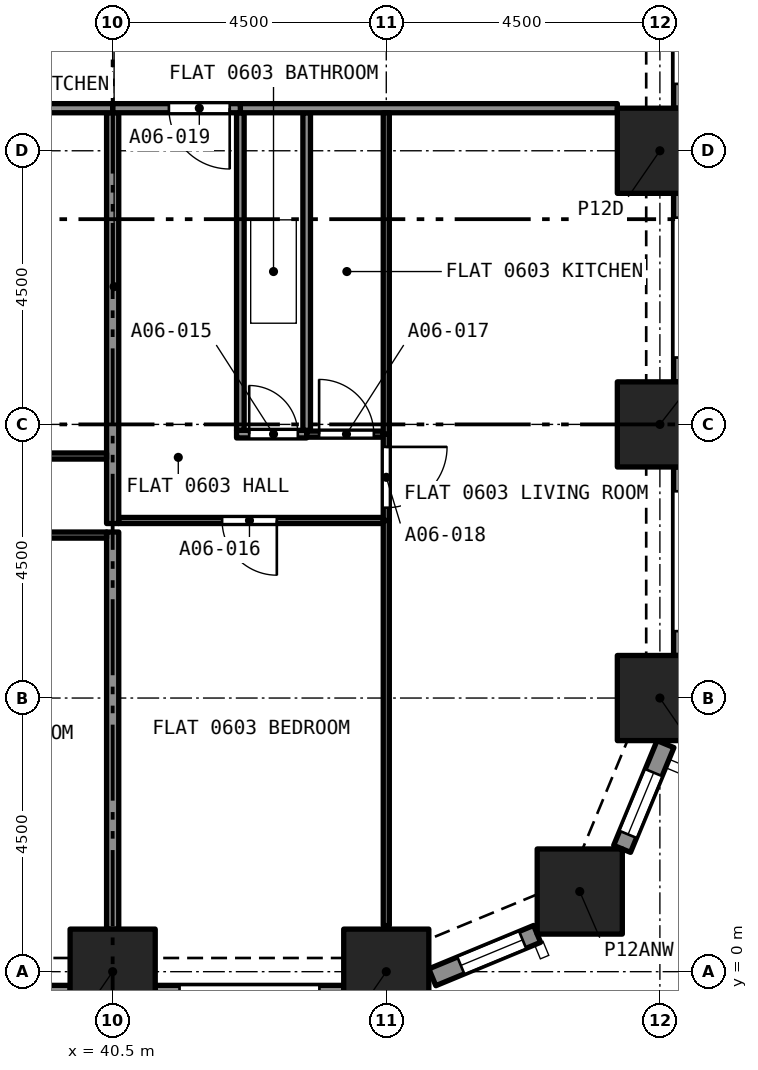
"""IFC4 building model, lengths in metres.
Left out: names, types, materials, properties, quantities, classifications, styles, units other than length and angle.
Written with IfcOpenShell. Run it as: python <this file> out.ifc"""

import sys

from ifc_helpers import new_model, si_unit, direction, frame, frame_2d, origin, origin_2d, place, context, subcontext, project, spatial, rectangle, extrude, element, fill, save


model = new_model("IFC4")
c1 = context("Model", 3, precision=1e-05, world=origin(), true_north=direction((0.0, 1.0)))
c2 = subcontext(c1, "Body", "Model", "MODEL_VIEW")
j1 = project(units=[si_unit("LENGTHUNIT", "METRE"), si_unit("PLANEANGLEUNIT", "RADIAN")], contexts=[c1])
p1 = place(None, origin())
s1 = spatial("IfcSite", under=j1, at=p1, CompositionType="ELEMENT")
p2 = place(p1, origin())
s2 = spatial("IfcBuilding", under=s1, at=p2, CompositionType="ELEMENT")
p3 = place(p2, frame((0.0, 0.0, 30.4)))
s3 = spatial("IfcBuildingStorey", under=s2, at=p3, CompositionType="ELEMENT", Elevation=30.4)
for number, where, z_axis, x_axis in (
    (1, (40.5, 0.0, 0.0), (0.0, 0.0, 1.0), (1.0, 0.0, 0.0)),
    (2, (45.0, 0.0, 0.0), (0.0, 0.0, 1.0), (1.0, 0.0, 0.0)),
    (3, (48.182, 1.318, 0.0), (0.0, 0.0, 1.0), (1.0, 0.0, 0.0)),
    (4, (49.5, 4.5, 0.0), (0.0, 0.0, 1.0), (1.0, 0.0, 0.0)),
    (5, (49.5, 9.0, 0.0), (0.0, 0.0, 1.0), (1.0, 0.0, 0.0)),
    (6, (49.5, 13.5, 0.0), (0.0, 0.0, 1.0), (1.0, 0.0, 0.0)),
):
    element("IfcColumn", number, at=place(p3, frame(where, z_axis=z_axis, x_axis=x_axis)), inside=s3, PredefinedType="COLUMN", context=c2, shape_type="SweptSolid", body=[
        extrude(rectangle(XDim=1.4, YDim=1.4, at=origin_2d()), origin(), (0.0, 0.0, 1.0), 3.2),
    ])
p4 = place(p3, frame((39.8, -0.375, 0.0), z_axis=(0.0, 0.0, 1.0), x_axis=(-1.0, 0.0, 0.0)))
e7 = element("IfcWall", 7, at=p4, inside=s3, PredefinedType="SOLIDWALL", context=c2, shape_type="SweptSolid", body=[
    extrude(rectangle(XDim=3.1, YDim=0.3, at=frame_2d((1.55, 0.0))), origin(), (0.0, 0.0, 1.0), 3.2),
])
p5 = place(p4, frame((0.4, 0.0, 0.45)))
e8 = element("IfcOpeningElement", 8, at=p5, cuts=e7, PredefinedType="OPENING", context=c2, shape_type="SweptSolid", body=[
    extrude(rectangle(XDim=2.3, YDim=1.95, at=frame_2d((1.15, 0.975))), frame((0.0, 0.16, 0.0), z_axis=(0.0, -1.0, 0.0), x_axis=(1.0, 0.0, 0.0)), (0.0, 0.0, 1.0), 0.32),
])
p6 = place(p3, frame((44.3, -0.375, 0.0), z_axis=(0.0, 0.0, 1.0), x_axis=(-1.0, 0.0, 0.0)))
e9 = element("IfcWall", 9, at=p6, inside=s3, PredefinedType="SOLIDWALL", context=c2, shape_type="SweptSolid", body=[
    extrude(rectangle(XDim=3.1, YDim=0.3, at=frame_2d((1.55, 0.0))), origin(), (0.0, 0.0, 1.0), 3.2),
])
p7 = place(p6, frame((0.4, 0.0, 0.45)))
e10 = element("IfcOpeningElement", 10, at=p7, cuts=e9, PredefinedType="OPENING", context=c2, shape_type="SweptSolid", body=[
    extrude(rectangle(XDim=2.3, YDim=1.95, at=frame_2d((1.15, 0.975))), frame((0.0, 0.16, 0.0), z_axis=(0.0, -1.0, 0.0), x_axis=(1.0, 0.0, 0.0)), (0.0, 0.0, 1.0), 0.32),
])
p8 = place(p3, frame((47.48, 0.622, 0.0), z_axis=(0.0, 0.0, 1.0), x_axis=(-0.923903565336, -0.38262540684, 0.0)))
e11 = element("IfcWall", 11, at=p8, inside=s3, PredefinedType="SOLIDWALL", context=c2, shape_type="SweptSolid", body=[
    extrude(rectangle(XDim=1.865, YDim=0.3, at=frame_2d((0.933, 0.0))), origin(), (0.0, 0.0, 1.0), 3.2),
])
p9 = place(p8, frame((0.258, 0.0, 0.45)))
e12 = element("IfcOpeningElement", 12, at=p9, cuts=e11, PredefinedType="OPENING", context=c2, shape_type="SweptSolid", body=[
    extrude(rectangle(XDim=1.1, YDim=1.95, at=frame_2d((0.55, 0.975))), frame((0.0, 0.16, 0.0), z_axis=(0.0, -1.0, 0.0), x_axis=(1.0, 0.0, 0.0)), (0.0, 0.0, 1.0), 0.32),
])
p10 = place(p3, frame((49.592, 3.743, 0.0), z_axis=(0.0, 0.0, 1.0), x_axis=(-0.382737135771, -0.923857286003, 0.0)))
e13 = element("IfcWall", 13, at=p10, inside=s3, PredefinedType="SOLIDWALL", context=c2, shape_type="SweptSolid", body=[
    extrude(rectangle(XDim=1.865, YDim=0.3, at=frame_2d((0.933, 0.0))), origin(), (0.0, 0.0, 1.0), 3.2),
])
p11 = place(p10, frame((0.508, 0.0, 0.45)))
e14 = element("IfcOpeningElement", 14, at=p11, cuts=e13, PredefinedType="OPENING", context=c2, shape_type="SweptSolid", body=[
    extrude(rectangle(XDim=1.1, YDim=1.95, at=frame_2d((0.55, 0.975))), frame((0.0, 0.16, 0.0), z_axis=(0.0, -1.0, 0.0), x_axis=(1.0, 0.0, 0.0)), (0.0, 0.0, 1.0), 0.32),
])
p12 = place(p3, frame((49.875, 8.3, 0.0), z_axis=(0.0, 0.0, 1.0), x_axis=(0.0, -1.0, 0.0)))
e15 = element("IfcWall", 15, at=p12, inside=s3, PredefinedType="SOLIDWALL", context=c2, shape_type="SweptSolid", body=[
    extrude(rectangle(XDim=3.1, YDim=0.3, at=frame_2d((1.55, 0.0))), origin(), (0.0, 0.0, 1.0), 3.2),
])
p13 = place(p12, frame((0.4, 0.0, 0.45)))
e16 = element("IfcOpeningElement", 16, at=p13, cuts=e15, PredefinedType="OPENING", context=c2, shape_type="SweptSolid", body=[
    extrude(rectangle(XDim=2.3, YDim=1.95, at=frame_2d((1.15, 0.975))), frame((0.0, 0.16, 0.0), z_axis=(0.0, -1.0, 0.0), x_axis=(1.0, 0.0, 0.0)), (0.0, 0.0, 1.0), 0.32),
])
p14 = place(p3, frame((49.875, 12.8, 0.0), z_axis=(0.0, 0.0, 1.0), x_axis=(0.0, -1.0, 0.0)))
e17 = element("IfcWall", 17, at=p14, inside=s3, PredefinedType="SOLIDWALL", context=c2, shape_type="SweptSolid", body=[
    extrude(rectangle(XDim=3.1, YDim=0.3, at=frame_2d((1.55, 0.0))), origin(), (0.0, 0.0, 1.0), 3.2),
])
p15 = place(p14, frame((0.4, 0.0, 0.45)))
e18 = element("IfcOpeningElement", 18, at=p15, cuts=e17, PredefinedType="OPENING", context=c2, shape_type="SweptSolid", body=[
    extrude(rectangle(XDim=2.3, YDim=1.95, at=frame_2d((1.15, 0.975))), frame((0.0, 0.16, 0.0), z_axis=(0.0, -1.0, 0.0), x_axis=(1.0, 0.0, 0.0)), (0.0, 0.0, 1.0), 0.32),
])
p16 = place(p3, frame((49.875, 17.3, 0.0), z_axis=(0.0, 0.0, 1.0), x_axis=(0.0, -1.0, 0.0)))
e19 = element("IfcWall", 19, at=p16, inside=s3, PredefinedType="SOLIDWALL", context=c2, shape_type="SweptSolid", body=[
    extrude(rectangle(XDim=3.1, YDim=0.3, at=frame_2d((1.55, 0.0))), origin(), (0.0, 0.0, 1.0), 3.2),
])
p17 = place(p16, frame((0.4, 0.0, 0.45)))
e20 = element("IfcOpeningElement", 20, at=p17, cuts=e19, PredefinedType="OPENING", context=c2, shape_type="SweptSolid", body=[
    extrude(rectangle(XDim=2.3, YDim=1.95, at=frame_2d((1.15, 0.975))), frame((0.0, 0.16, 0.0), z_axis=(0.0, -1.0, 0.0), x_axis=(1.0, 0.0, 0.0)), (0.0, 0.0, 1.0), 0.32),
])
p18 = place(p3, frame((42.538, 8.84, 0.0), z_axis=(0.0, 0.0, 1.0), x_axis=(1.0, 0.0, 0.0)))
e21 = element("IfcWall", 21, at=p18, inside=s3, PredefinedType="PARTITIONING", context=c2, shape_type="SweptSolid", body=[
    extrude(rectangle(XDim=1.153, YDim=0.125, at=frame_2d((0.577, 0.0))), origin(), (0.0, 0.0, 1.0), 2.9),
])
p19 = place(p18, frame((0.208, 0.0, 0.0)))
e22 = element("IfcOpeningElement", 22, at=p19, cuts=e21, PredefinedType="OPENING", context=c2, shape_type="SweptSolid", body=[
    extrude(rectangle(XDim=0.8, YDim=2.1, at=frame_2d((0.4, 1.05))), frame((0.0, 0.073, 0.0), z_axis=(0.0, -1.0, 0.0), x_axis=(1.0, 0.0, 0.0)), (0.0, 0.0, 1.0), 0.145),
])
for number, where, z_axis, x_axis in (
    (23, (42.6, 8.903, 0.0), (0.0, 0.0, 1.0), (0.0, 1.0, 0.0)),
    (24, (43.691, 8.903, 0.0), (0.0, 0.0, 1.0), (0.0, 1.0, 0.0)),
):
    element("IfcWall", number, at=place(p3, frame(where, z_axis=z_axis, x_axis=x_axis)), inside=s3, PredefinedType="PARTITIONING", context=c2, shape_type="SweptSolid", body=[
        extrude(rectangle(XDim=5.222, YDim=0.125, at=frame_2d((2.611, 0.0))), origin(), (0.0, 0.0, 1.0), 2.9),
    ])
p20 = place(p3, frame((42.6, 14.2, 0.0), z_axis=(0.0, 0.0, 1.0), x_axis=(1.0, 0.0, 0.0)))
e25 = element("IfcWall", 25, at=p20, inside=s3, PredefinedType="PARTITIONING", context=c2, shape_type="SweptSolid", body=[
    extrude(rectangle(XDim=6.2, YDim=0.15, at=frame_2d((3.1, 0.0))), origin(), (0.0, 0.0, 1.0), 2.9),
])
p21 = place(p3, frame((44.95, 7.42, 0.0), z_axis=(0.0, 0.0, 1.0), x_axis=(-1.0, 0.0, 0.0)))
e26 = element("IfcWall", 26, at=p21, inside=s3, PredefinedType="PARTITIONING", context=c2, shape_type="SweptSolid", body=[
    extrude(rectangle(XDim=4.35, YDim=0.1, at=frame_2d((2.175, 0.0))), origin(), (0.0, 0.0, 1.0), 2.9),
])
p22 = place(p21, frame((1.75, 0.0, 0.0)))
e27 = element("IfcOpeningElement", 27, at=p22, cuts=e26, PredefinedType="OPENING", context=c2, shape_type="SweptSolid", body=[
    extrude(rectangle(XDim=0.9, YDim=2.1, at=frame_2d((0.45, 1.05))), frame((0.0, 0.06, 0.0), z_axis=(0.0, -1.0, 0.0), x_axis=(1.0, 0.0, 0.0)), (0.0, 0.0, 1.0), 0.12),
])
p23 = place(p3, frame((45.0, 0.758, 0.0), z_axis=(0.0, 0.0, 1.0), x_axis=(0.0, 1.0, 0.0)))
e28 = element("IfcWall", 28, at=p23, inside=s3, PredefinedType="PARTITIONING", context=c2, shape_type="SweptSolid", body=[
    extrude(rectangle(XDim=6.662, YDim=0.1, at=frame_2d((3.331, 0.0))), origin(), (0.0, 0.0, 1.0), 2.9),
])
p24 = place(p3, frame((40.5, 0.7, 0.0), z_axis=(0.0, 0.0, 1.0), x_axis=(0.0, 1.0, 0.0)))
e29 = element("IfcWall", 29, at=p24, inside=s3, PredefinedType="PARTITIONING", context=c2, shape_type="SweptSolid", body=[
    extrude(rectangle(XDim=6.53, YDim=0.2, at=frame_2d((3.265, 0.0))), origin(), (0.0, 0.0, 1.0), 2.9),
])
p25 = place(p3, frame((43.691, 8.84, 0.0), z_axis=(0.0, 0.0, 1.0), x_axis=(1.0, 0.0, 0.0)))
e30 = element("IfcWall", 30, at=p25, inside=s3, PredefinedType="PARTITIONING", context=c2, shape_type="SweptSolid", body=[
    extrude(rectangle(XDim=1.259, YDim=0.1, at=frame_2d((0.629, 0.0))), origin(), (0.0, 0.0, 1.0), 2.9),
])
p26 = place(p25, frame((0.205, 0.0, 0.0)))
e31 = element("IfcOpeningElement", 31, at=p26, cuts=e30, PredefinedType="OPENING", context=c2, shape_type="SweptSolid", body=[
    extrude(rectangle(XDim=0.9, YDim=2.1, at=frame_2d((0.45, 1.05))), frame((0.0, 0.06, 0.0), z_axis=(0.0, -1.0, 0.0), x_axis=(1.0, 0.0, 0.0)), (0.0, 0.0, 1.0), 0.12),
])
p27 = place(p3, frame((45.0, 8.84, 0.0), z_axis=(0.0, 0.0, 1.0), x_axis=(0.0, -1.0, 0.0)))
e32 = element("IfcWall", 32, at=p27, inside=s3, PredefinedType="PARTITIONING", context=c2, shape_type="SweptSolid", body=[
    extrude(rectangle(XDim=1.42, YDim=0.1, at=frame_2d((0.71, 0.0))), origin(), (0.0, 0.0, 1.0), 2.9),
])
p28 = place(p27, frame((0.21, 0.0, 0.0)))
e33 = element("IfcOpeningElement", 33, at=p28, cuts=e32, PredefinedType="OPENING", context=c2, shape_type="SweptSolid", body=[
    extrude(rectangle(XDim=1.0, YDim=2.1, at=frame_2d((0.5, 1.05))), frame((0.0, 0.06, 0.0), z_axis=(0.0, -1.0, 0.0), x_axis=(1.0, 0.0, 0.0)), (0.0, 0.0, 1.0), 0.12),
])
p29 = place(p3, frame((40.5, 7.37, 0.0), z_axis=(0.0, 0.0, 1.0), x_axis=(0.0, 1.0, 0.0)))
e34 = element("IfcWall", 34, at=p29, inside=s3, PredefinedType="PARTITIONING", context=c2, shape_type="SweptSolid", body=[
    extrude(rectangle(XDim=6.755, YDim=0.2, at=frame_2d((3.377, 0.0))), origin(), (0.0, 0.0, 1.0), 2.9),
])
p30 = place(p3, frame((42.6, 14.2, 0.0), z_axis=(0.0, 0.0, 1.0), x_axis=(-1.0, 0.0, 0.0)))
e35 = element("IfcWall", 35, at=p30, inside=s3, PredefinedType="PARTITIONING", context=c2, shape_type="SweptSolid", body=[
    extrude(rectangle(XDim=2.1, YDim=0.15, at=frame_2d((1.05, 0.0))), origin(), (0.0, 0.0, 1.0), 2.9),
])
p31 = place(p30, frame((0.175, 0.0, 0.0)))
e36 = element("IfcOpeningElement", 36, at=p31, cuts=e35, PredefinedType="OPENING", context=c2, shape_type="SweptSolid", body=[
    extrude(rectangle(XDim=1.0, YDim=2.1, at=frame_2d((0.5, 1.05))), frame((0.0, 0.085, 0.0), z_axis=(0.0, -1.0, 0.0), x_axis=(1.0, 0.0, 0.0)), (0.0, 0.0, 1.0), 0.17),
])
p32 = place(p3, frame((45.0, 8.84, 0.0), z_axis=(0.0, 0.0, 1.0), x_axis=(0.0, 1.0, 0.0)))
e37 = element("IfcWall", 37, at=p32, inside=s3, PredefinedType="PARTITIONING", context=c2, shape_type="SweptSolid", body=[
    extrude(rectangle(XDim=5.285, YDim=0.1, at=frame_2d((2.643, 0.0))), origin(), (0.0, 0.0, 1.0), 2.9),
])
p33 = place(p3, frame((34.425, 14.2, 0.0), z_axis=(0.0, 0.0, 1.0), x_axis=(1.0, 0.0, 0.0)))
e38 = element("IfcWall", 38, at=p33, inside=s3, PredefinedType="PARTITIONING", context=c2, shape_type="SweptSolid", body=[
    extrude(rectangle(XDim=6.075, YDim=0.15, at=frame_2d((3.038, 0.0))), origin(), (0.0, 0.0, 1.0), 2.9),
])
p34 = place(p3, frame((40.4, 7.18, 0.0), z_axis=(0.0, 0.0, 1.0), x_axis=(-1.0, 0.0, 0.0)))
e39 = element("IfcWall", 39, at=p34, inside=s3, PredefinedType="PARTITIONING", context=c2, shape_type="SweptSolid", body=[
    extrude(rectangle(XDim=4.4, YDim=0.1, at=frame_2d((2.2, 0.0))), origin(), (0.0, 0.0, 1.0), 2.9),
])
p35 = place(p34, frame((1.7, 0.0, 0.0)))
e40 = element("IfcOpeningElement", 40, at=p35, cuts=e39, PredefinedType="OPENING", context=c2, shape_type="SweptSolid", body=[
    extrude(rectangle(XDim=0.9, YDim=2.1, at=frame_2d((0.45, 1.05))), frame((0.0, 0.06, 0.0), z_axis=(0.0, -1.0, 0.0), x_axis=(1.0, 0.0, 0.0)), (0.0, 0.0, 1.0), 0.12),
])
p36 = place(p3, frame((37.178, 8.48, 0.0), z_axis=(0.0, 0.0, 1.0), x_axis=(1.0, 0.0, 0.0)))
e41 = element("IfcWall", 41, at=p36, inside=s3, PredefinedType="PARTITIONING", context=c2, shape_type="SweptSolid", body=[
    extrude(rectangle(XDim=3.222, YDim=0.1, at=frame_2d((1.611, 0.0))), origin(), (0.0, 0.0, 1.0), 2.9),
])
p37 = place(p36, frame((1.211, 0.0, 0.0)))
e42 = element("IfcOpeningElement", 42, at=p37, cuts=e41, PredefinedType="OPENING", context=c2, shape_type="SweptSolid", body=[
    extrude(rectangle(XDim=0.9, YDim=2.1, at=frame_2d((0.45, 1.05))), frame((0.0, 0.06, 0.0), z_axis=(0.0, -1.0, 0.0), x_axis=(1.0, 0.0, 0.0)), (0.0, 0.0, 1.0), 0.12),
])
p38 = place(p9, origin())
e43 = element("IfcWindow", 43, at=p38, inside=s3, PartitioningType="SINGLE_PANEL", PredefinedType="WINDOW", context=c2, shape_type="SweptSolid", body=[
    extrude(rectangle(XDim=1.1, YDim=1.95, at=frame_2d((0.55, 0.975))), frame((0.0, 0.03, 0.0), z_axis=(0.0, -1.0, 0.0), x_axis=(1.0, 0.0, 0.0)), (0.0, 0.0, 1.0), 0.06),
])
fill(e12, e43)
p39 = place(p11, origin())
e44 = element("IfcWindow", 44, at=p39, inside=s3, PartitioningType="SINGLE_PANEL", PredefinedType="WINDOW", context=c2, shape_type="SweptSolid", body=[
    extrude(rectangle(XDim=1.1, YDim=1.95, at=frame_2d((0.55, 0.975))), frame((0.0, 0.03, 0.0), z_axis=(0.0, -1.0, 0.0), x_axis=(1.0, 0.0, 0.0)), (0.0, 0.0, 1.0), 0.06),
])
fill(e14, e44)
p40 = place(p19, origin())
e45 = element("IfcDoor", 45, at=p40, inside=s3, OperationType="SINGLE_SWING_RIGHT", PredefinedType="DOOR", context=c2, shape_type="SweptSolid", body=[
    extrude(rectangle(XDim=0.8, YDim=2.1, at=frame_2d((0.4, 1.05))), frame((0.0, 0.025, 0.0), z_axis=(0.0, -1.0, 0.0), x_axis=(1.0, 0.0, 0.0)), (0.0, 0.0, 1.0), 0.05),
])
fill(e22, e45)
p41 = place(p22, origin())
e46 = element("IfcDoor", 46, at=p41, inside=s3, OperationType="SINGLE_SWING_RIGHT", PredefinedType="DOOR", context=c2, shape_type="SweptSolid", body=[
    extrude(rectangle(XDim=0.9, YDim=2.1, at=frame_2d((0.45, 1.05))), frame((0.0, 0.025, 0.0), z_axis=(0.0, -1.0, 0.0), x_axis=(1.0, 0.0, 0.0)), (0.0, 0.0, 1.0), 0.05),
])
fill(e27, e46)
p42 = place(p26, origin())
e47 = element("IfcDoor", 47, at=p42, inside=s3, OperationType="SINGLE_SWING_RIGHT", PredefinedType="DOOR", context=c2, shape_type="SweptSolid", body=[
    extrude(rectangle(XDim=0.9, YDim=2.1, at=frame_2d((0.45, 1.05))), frame((0.0, 0.025, 0.0), z_axis=(0.0, -1.0, 0.0), x_axis=(1.0, 0.0, 0.0)), (0.0, 0.0, 1.0), 0.05),
])
fill(e31, e47)
p43 = place(p28, origin())
e48 = element("IfcDoor", 48, at=p43, inside=s3, OperationType="SINGLE_SWING_RIGHT", PredefinedType="DOOR", context=c2, shape_type="SweptSolid", body=[
    extrude(rectangle(XDim=1.0, YDim=2.1, at=frame_2d((0.5, 1.05))), frame((0.0, 0.025, 0.0), z_axis=(0.0, -1.0, 0.0), x_axis=(1.0, 0.0, 0.0)), (0.0, 0.0, 1.0), 0.05),
])
fill(e33, e48)
p44 = place(p31, origin())
e49 = element("IfcDoor", 49, at=p44, inside=s3, OperationType="SINGLE_SWING_LEFT", PredefinedType="DOOR", context=c2, shape_type="SweptSolid", body=[
    extrude(rectangle(XDim=1.0, YDim=2.1, at=frame_2d((0.5, 1.05))), frame((0.0, 0.025, 0.0), z_axis=(0.0, -1.0, 0.0), x_axis=(1.0, 0.0, 0.0)), (0.0, 0.0, 1.0), 0.05),
])
fill(e36, e49)
save(model, sys.argv[1])
